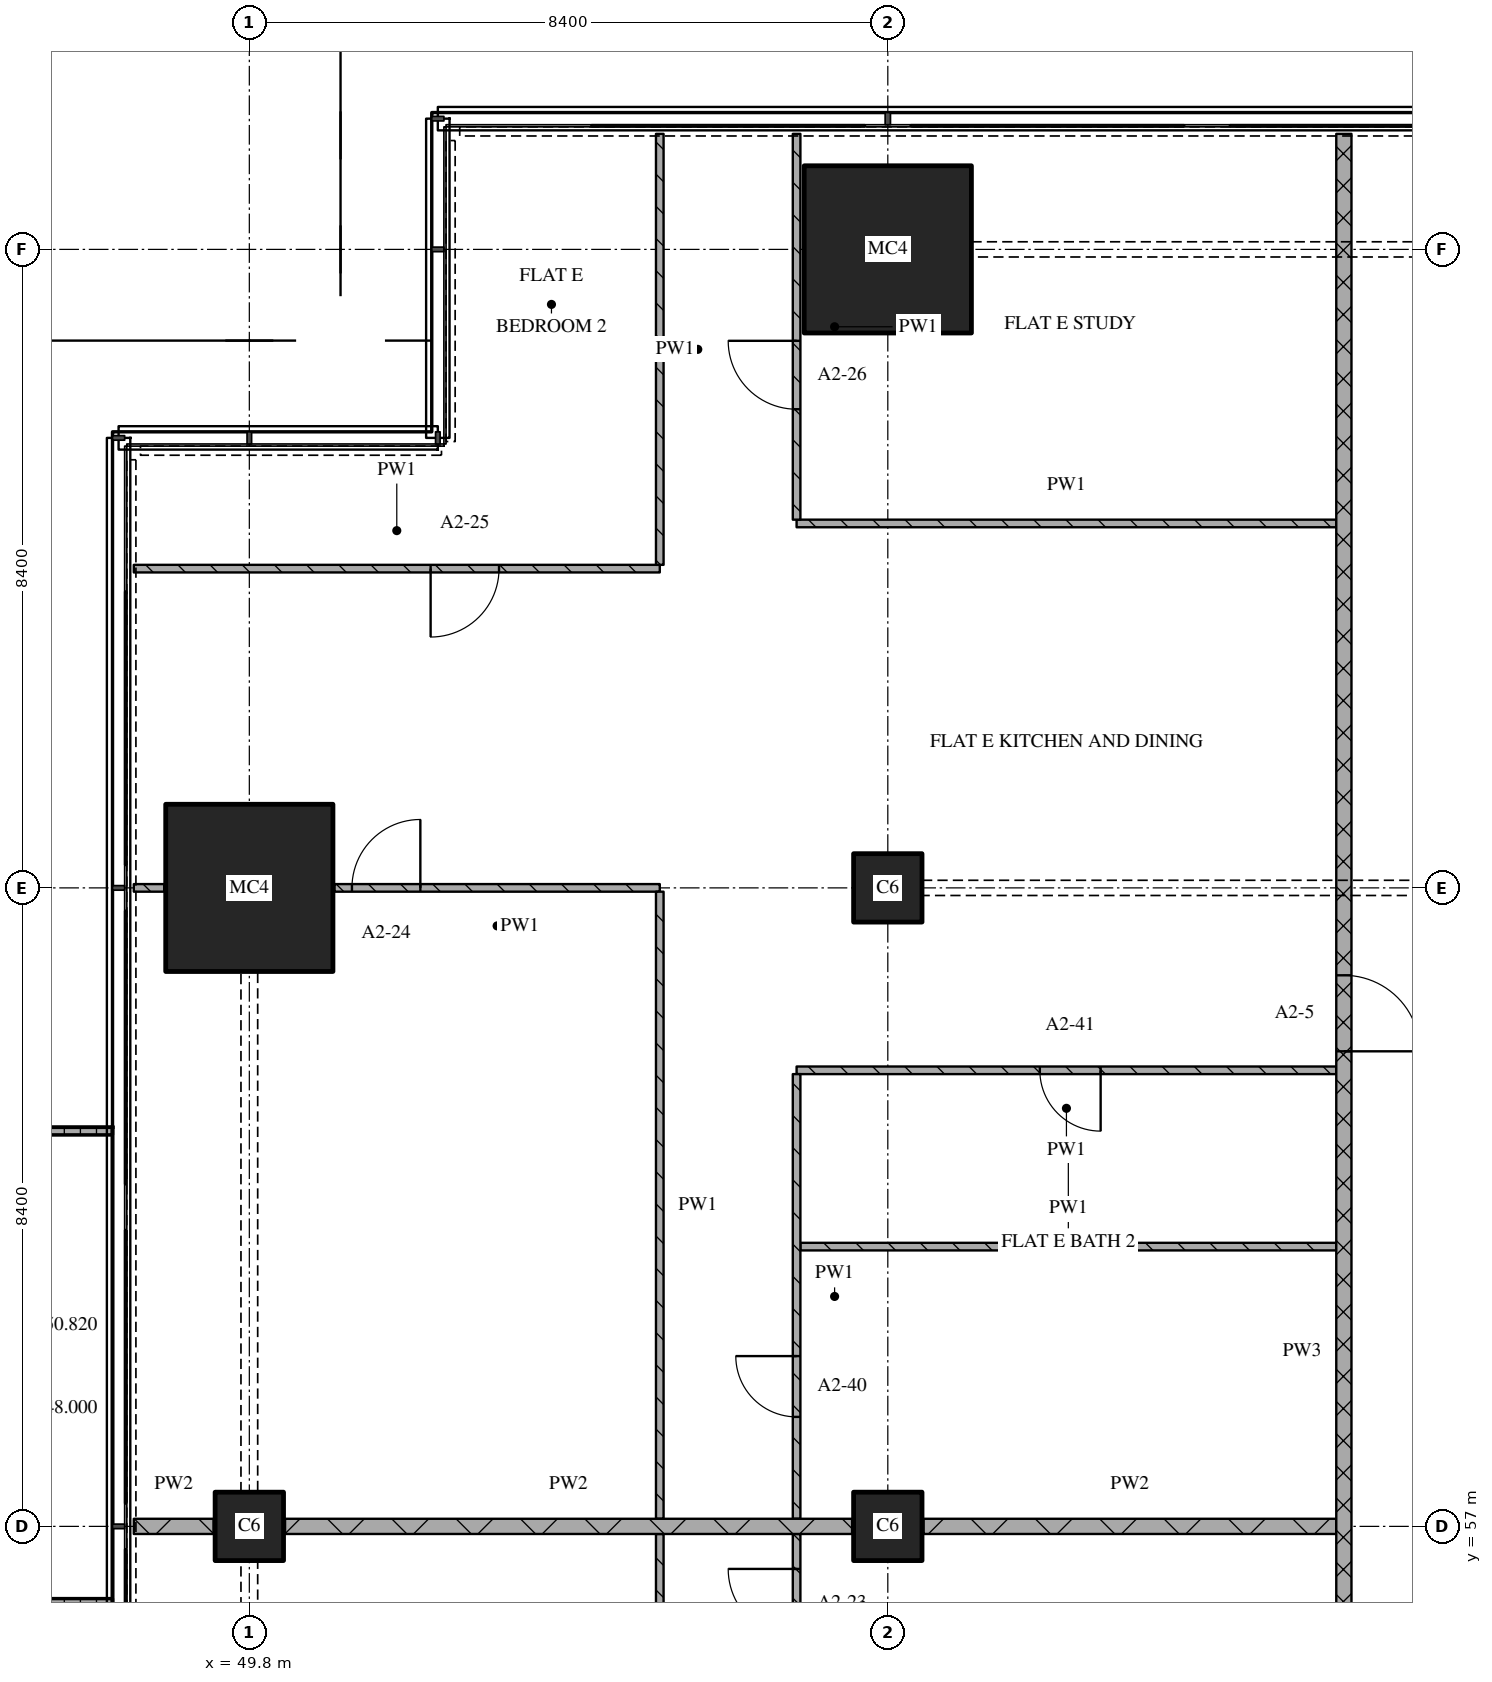
"""IFC4 building model, lengths in metres.
Left out: names, types, materials, properties, quantities, classifications, styles, units other than length and angle.
Written with IfcOpenShell. Run it as: python <this file> out.ifc"""

import sys

from ifc_helpers import new_model, si_unit, direction, frame, frame_2d, origin, origin_2d, place, context, subcontext, project, spatial, polyline, rectangle, outline, extrude, element, fill, save


model = new_model("IFC4")
c1 = context("Model", 3, precision=1e-05, world=origin(), true_north=direction((0.0, 1.0)))
c2 = subcontext(c1, "Body", "Model", "MODEL_VIEW")
j1 = project(units=[si_unit("LENGTHUNIT", "METRE"), si_unit("PLANEANGLEUNIT", "RADIAN")], contexts=[c1])
p1 = place(None, origin())
s1 = spatial("IfcSite", under=j1, at=p1, CompositionType="ELEMENT")
p2 = place(p1, origin())
s2 = spatial("IfcBuilding", under=s1, at=p2, CompositionType="ELEMENT")
p3 = place(p2, frame((0.0, 0.0, 48.0)))
s3 = spatial("IfcBuildingStorey", under=s2, at=p3, CompositionType="ELEMENT", Elevation=48.0)
p4 = place(p3, frame((49.8, 57.0, 0.0), z_axis=(0.0, 0.0, 1.0), x_axis=(1.0, 0.0, 0.0)))
e1 = element("IfcColumn", 1, at=p4, inside=s3, PredefinedType="COLUMN", context=c2, shape_type="SweptSolid", body=[
    extrude(rectangle(XDim=0.9, YDim=0.9, at=origin_2d()), origin(), (0.0, 0.0, 1.0), 3.6),
])
p5 = place(p3, frame((49.8, 65.4, 0.0), z_axis=(0.0, 0.0, 1.0), x_axis=(1.0, 0.0, 0.0)))
e2 = element("IfcColumn", 2, at=p5, inside=s3, PredefinedType="COLUMN", context=c2, shape_type="SweptSolid", body=[
    extrude(rectangle(XDim=2.2, YDim=2.2, at=origin_2d()), origin(), (0.0, 0.0, 1.0), 3.6),
])
for number, where, z_axis, x_axis in (
    (3, (58.2, 57.0, 0.0), (0.0, 0.0, 1.0), (1.0, 0.0, 0.0)),
    (4, (58.2, 65.4, 0.0), (0.0, 0.0, 1.0), (1.0, 0.0, 0.0)),
):
    element("IfcColumn", number, at=place(p3, frame(where, z_axis=z_axis, x_axis=x_axis)), inside=s3, PredefinedType="COLUMN", context=c2, shape_type="SweptSolid", body=[
        extrude(rectangle(XDim=0.9, YDim=0.9, at=origin_2d()), origin(), (0.0, 0.0, 1.0), 3.6),
    ])
p6 = place(p3, frame((58.2, 73.8, 0.0), z_axis=(0.0, 0.0, 1.0), x_axis=(1.0, 0.0, 0.0)))
e5 = element("IfcColumn", 5, at=p6, inside=s3, PredefinedType="COLUMN", context=c2, shape_type="SweptSolid", body=[
    extrude(rectangle(XDim=2.2, YDim=2.2, at=origin_2d()), origin(), (0.0, 0.0, 1.0), 3.6),
])
p7 = place(p3, origin())
e6 = element("IfcWall", 6, at=p7, inside=s3, PredefinedType="SOLIDWALL", context=c2, shape_type="SweptSolid", body=[
    extrude(outline(polyline([(48.0, 62.25), (48.0, 62.15), (46.233, 62.15), (46.233, 56.05), (48.0, 56.05), (48.0, 55.95), (46.133, 55.95), (46.133, 62.25), (48.0, 62.25)])), origin(), (0.0, 0.0, 1.0), 1.0),
])
p8 = place(p3, frame((48.28, 57.0, 0.0), z_axis=(0.0, 0.0, 1.0), x_axis=(1.0, 0.0, 0.0)))
e7 = element("IfcWall", 7, at=p8, inside=s3, PredefinedType="PARTITIONING", context=c2, shape_type="SweptSolid", body=[
    extrude(rectangle(XDim=1.05, YDim=0.2, at=frame_2d((0.525, 0.0))), origin(), (0.0, 0.0, 1.0), 3.32),
])
p9 = place(p3, frame((50.27, 57.0, 0.0), z_axis=(0.0, 0.0, 1.0), x_axis=(1.0, 0.0, 0.0)))
e8 = element("IfcWall", 8, at=p9, inside=s3, PredefinedType="PARTITIONING", context=c2, shape_type="SweptSolid", body=[
    extrude(rectangle(XDim=7.46, YDim=0.2, at=frame_2d((3.73, 0.0))), origin(), (0.0, 0.0, 1.0), 3.32),
])
p10 = place(p3, frame((58.67, 57.0, 0.0), z_axis=(0.0, 0.0, 1.0), x_axis=(1.0, 0.0, 0.0)))
e9 = element("IfcWall", 9, at=p10, inside=s3, PredefinedType="PARTITIONING", context=c2, shape_type="SweptSolid", body=[
    extrude(rectangle(XDim=5.43, YDim=0.2, at=frame_2d((2.715, 0.0))), origin(), (0.0, 0.0, 1.0), 3.32),
])
p11 = place(p3, frame((57.05, 60.681, 0.0), z_axis=(0.0, 0.0, 1.0), x_axis=(1.0, 0.0, 0.0)))
e10 = element("IfcWall", 10, at=p11, inside=s3, PredefinedType="PARTITIONING", context=c2, shape_type="SweptSolid", body=[
    extrude(rectangle(XDim=7.05, YDim=0.1, at=frame_2d((3.525, 0.0))), origin(), (0.0, 0.0, 1.0), 3.32),
])
p12 = place(p3, frame((64.1, 63.0, 0.0), z_axis=(0.0, 0.0, 1.0), x_axis=(-1.0, 0.0, 0.0)))
e11 = element("IfcWall", 11, at=p12, inside=s3, PredefinedType="PARTITIONING", context=c2, shape_type="SweptSolid", body=[
    extrude(rectangle(XDim=7.1, YDim=0.1, at=frame_2d((3.55, 0.0))), origin(), (0.0, 0.0, 1.0), 3.32),
])
p13 = place(p12, frame((3.1, 0.0, 0.0)))
e12 = element("IfcOpeningElement", 12, at=p13, cuts=e11, PredefinedType="OPENING", context=c2, shape_type="SweptSolid", body=[
    extrude(rectangle(XDim=0.8, YDim=2.1, at=frame_2d((0.4, 1.05))), frame((0.0, 0.06, 0.0), z_axis=(0.0, -1.0, 0.0), x_axis=(1.0, 0.0, 0.0)), (0.0, 0.0, 1.0), 0.12),
])
p14 = place(p3, frame((48.28, 65.4, 0.0), z_axis=(0.0, 0.0, 1.0), x_axis=(1.0, 0.0, 0.0)))
e13 = element("IfcWall", 13, at=p14, inside=s3, PredefinedType="PARTITIONING", context=c2, shape_type="SweptSolid", body=[
    extrude(rectangle(XDim=0.4, YDim=0.1, at=frame_2d((0.2, 0.0))), origin(), (0.0, 0.0, 1.0), 3.32),
])
p15 = place(p3, frame((55.2, 65.4, 0.0), z_axis=(0.0, 0.0, 1.0), x_axis=(-1.0, 0.0, 0.0)))
e14 = element("IfcWall", 14, at=p15, inside=s3, PredefinedType="PARTITIONING", context=c2, shape_type="SweptSolid", body=[
    extrude(rectangle(XDim=4.28, YDim=0.1, at=frame_2d((2.14, 0.0))), origin(), (0.0, 0.0, 1.0), 3.32),
])
p16 = place(p15, frame((3.15, 0.0, 0.0)))
e15 = element("IfcOpeningElement", 15, at=p16, cuts=e14, PredefinedType="OPENING", context=c2, shape_type="SweptSolid", body=[
    extrude(rectangle(XDim=0.9, YDim=2.1, at=frame_2d((0.45, 1.05))), frame((0.0, 0.06, 0.0), z_axis=(0.0, -1.0, 0.0), x_axis=(1.0, 0.0, 0.0)), (0.0, 0.0, 1.0), 0.12),
])
p17 = place(p3, frame((48.28, 69.6, 0.0), z_axis=(0.0, 0.0, 1.0), x_axis=(1.0, 0.0, 0.0)))
e16 = element("IfcWall", 16, at=p17, inside=s3, PredefinedType="PARTITIONING", context=c2, shape_type="SweptSolid", body=[
    extrude(rectangle(XDim=6.92, YDim=0.1, at=frame_2d((3.46, 0.0))), origin(), (0.0, 0.0, 1.0), 3.32),
])
p18 = place(p17, frame((3.905, 0.0, 0.0)))
e17 = element("IfcOpeningElement", 17, at=p18, cuts=e16, PredefinedType="OPENING", context=c2, shape_type="SweptSolid", body=[
    extrude(rectangle(XDim=0.9, YDim=2.1, at=frame_2d((0.45, 1.05))), frame((0.0, 0.06, 0.0), z_axis=(0.0, -1.0, 0.0), x_axis=(1.0, 0.0, 0.0)), (0.0, 0.0, 1.0), 0.12),
])
p19 = place(p3, frame((57.0, 70.194, 0.0), z_axis=(0.0, 0.0, 1.0), x_axis=(1.0, 0.0, 0.0)))
e18 = element("IfcWall", 18, at=p19, inside=s3, PredefinedType="PARTITIONING", context=c2, shape_type="SweptSolid", body=[
    extrude(rectangle(XDim=7.1, YDim=0.1, at=frame_2d((3.55, 0.0))), origin(), (0.0, 0.0, 1.0), 3.32),
])
p20 = place(p3, frame((55.2, 75.32, 0.0), z_axis=(0.0, 0.0, 1.0), x_axis=(0.0, -1.0, 0.0)))
e19 = element("IfcWall", 19, at=p20, inside=s3, PredefinedType="PARTITIONING", context=c2, shape_type="SweptSolid", body=[
    extrude(rectangle(XDim=5.67, YDim=0.1, at=frame_2d((2.835, 0.0))), origin(), (0.0, 0.0, 1.0), 3.32),
])
p21 = place(p3, frame((57.0, 75.32, 0.0), z_axis=(0.0, 0.0, 1.0), x_axis=(0.0, -1.0, 0.0)))
e20 = element("IfcWall", 20, at=p21, inside=s3, PredefinedType="PARTITIONING", context=c2, shape_type="SweptSolid", body=[
    extrude(rectangle(XDim=5.076, YDim=0.1, at=frame_2d((2.538, 0.0))), origin(), (0.0, 0.0, 1.0), 3.32),
])
p22 = place(p21, frame((2.723, 0.0, 0.0)))
e21 = element("IfcOpeningElement", 21, at=p22, cuts=e20, PredefinedType="OPENING", context=c2, shape_type="SweptSolid", body=[
    extrude(rectangle(XDim=0.9, YDim=2.1, at=frame_2d((0.45, 1.05))), frame((0.0, 0.06, 0.0), z_axis=(0.0, -1.0, 0.0), x_axis=(1.0, 0.0, 0.0)), (0.0, 0.0, 1.0), 0.12),
])
p23 = place(p3, frame((64.2, 43.3, 0.0), z_axis=(0.0, 0.0, 1.0), x_axis=(0.0, 1.0, 0.0)))
e22 = element("IfcWall", 22, at=p23, inside=s3, PredefinedType="PARTITIONING", context=c2, shape_type="SweptSolid", body=[
    extrude(rectangle(XDim=32.02, YDim=0.2, at=frame_2d((16.01, 0.0))), origin(), (0.0, 0.0, 1.0), 3.32),
])
p24 = place(p23, frame((19.95, 0.0, 0.0)))
e23 = element("IfcOpeningElement", 23, at=p24, cuts=e22, PredefinedType="OPENING", context=c2, shape_type="SweptSolid", body=[
    extrude(rectangle(XDim=1.0, YDim=2.1, at=frame_2d((0.5, 1.05))), frame((0.0, 0.11, 0.0), z_axis=(0.0, -1.0, 0.0), x_axis=(1.0, 0.0, 0.0)), (0.0, 0.0, 1.0), 0.22),
])
for number, where, z_axis, x_axis in (
    (24, (55.2, 56.9, 0.0), (0.0, 0.0, 1.0), (0.0, -1.0, 0.0)),
    (25, (55.2, 65.35, 0.0), (0.0, 0.0, 1.0), (0.0, -1.0, 0.0)),
):
    element("IfcWall", number, at=place(p3, frame(where, z_axis=z_axis, x_axis=x_axis)), inside=s3, PredefinedType="PARTITIONING", context=c2, shape_type="SweptSolid", body=[
        extrude(rectangle(XDim=8.25, YDim=0.1, at=frame_2d((4.125, 0.0))), origin(), (0.0, 0.0, 1.0), 3.32),
    ])
p25 = place(p3, frame((57.0, 56.9, 0.0), z_axis=(0.0, 0.0, 1.0), x_axis=(0.0, -1.0, 0.0)))
e26 = element("IfcWall", 26, at=p25, inside=s3, PredefinedType="PARTITIONING", context=c2, shape_type="SweptSolid", body=[
    extrude(rectangle(XDim=5.25, YDim=0.1, at=frame_2d((2.625, 0.0))), origin(), (0.0, 0.0, 1.0), 3.32),
])
p26 = place(p25, frame((0.46, 0.0, 0.0)))
e27 = element("IfcOpeningElement", 27, at=p26, cuts=e26, PredefinedType="OPENING", context=c2, shape_type="SweptSolid", body=[
    extrude(rectangle(XDim=0.9, YDim=2.1, at=frame_2d((0.45, 1.05))), frame((0.0, 0.06, 0.0), z_axis=(0.0, -1.0, 0.0), x_axis=(1.0, 0.0, 0.0)), (0.0, 0.0, 1.0), 0.12),
])
p27 = place(p3, frame((57.0, 62.95, 0.0), z_axis=(0.0, 0.0, 1.0), x_axis=(0.0, -1.0, 0.0)))
e28 = element("IfcWall", 28, at=p27, inside=s3, PredefinedType="PARTITIONING", context=c2, shape_type="SweptSolid", body=[
    extrude(rectangle(XDim=5.85, YDim=0.1, at=frame_2d((2.925, 0.0))), origin(), (0.0, 0.0, 1.0), 3.32),
])
p28 = place(p27, frame((3.71, 0.0, 0.0)))
e29 = element("IfcOpeningElement", 29, at=p28, cuts=e28, PredefinedType="OPENING", context=c2, shape_type="SweptSolid", body=[
    extrude(rectangle(XDim=0.8, YDim=2.1, at=frame_2d((0.4, 1.05))), frame((0.0, 0.06, 0.0), z_axis=(0.0, -1.0, 0.0), x_axis=(1.0, 0.0, 0.0)), (0.0, 0.0, 1.0), 0.12),
])
p29 = place(p13, origin())
e30 = element("IfcDoor", 30, at=p29, inside=s3, OperationType="SINGLE_SWING_LEFT", PredefinedType="DOOR", context=c2, shape_type="SweptSolid", body=[
    extrude(rectangle(XDim=0.8, YDim=2.1, at=frame_2d((0.4, 1.05))), frame((0.0, 0.025, 0.0), z_axis=(0.0, -1.0, 0.0), x_axis=(1.0, 0.0, 0.0)), (0.0, 0.0, 1.0), 0.05),
])
fill(e12, e30)
p30 = place(p16, origin())
e31 = element("IfcDoor", 31, at=p30, inside=s3, OperationType="SINGLE_SWING_RIGHT", PredefinedType="DOOR", context=c2, shape_type="SweptSolid", body=[
    extrude(rectangle(XDim=0.9, YDim=2.1, at=frame_2d((0.45, 1.05))), frame((0.0, 0.025, 0.0), z_axis=(0.0, -1.0, 0.0), x_axis=(1.0, 0.0, 0.0)), (0.0, 0.0, 1.0), 0.05),
])
fill(e15, e31)
p31 = place(p18, origin())
e32 = element("IfcDoor", 32, at=p31, inside=s3, OperationType="SINGLE_SWING_RIGHT", PredefinedType="DOOR", context=c2, shape_type="SweptSolid", body=[
    extrude(rectangle(XDim=0.9, YDim=2.1, at=frame_2d((0.45, 1.05))), frame((0.0, 0.025, 0.0), z_axis=(0.0, -1.0, 0.0), x_axis=(1.0, 0.0, 0.0)), (0.0, 0.0, 1.0), 0.05),
])
fill(e17, e32)
p32 = place(p22, origin())
e33 = element("IfcDoor", 33, at=p32, inside=s3, OperationType="SINGLE_SWING_RIGHT", PredefinedType="DOOR", context=c2, shape_type="SweptSolid", body=[
    extrude(rectangle(XDim=0.9, YDim=2.1, at=frame_2d((0.45, 1.05))), frame((0.0, 0.025, 0.0), z_axis=(0.0, -1.0, 0.0), x_axis=(1.0, 0.0, 0.0)), (0.0, 0.0, 1.0), 0.05),
])
fill(e21, e33)
p33 = place(p24, origin())
e34 = element("IfcDoor", 34, at=p33, inside=s3, OperationType="SINGLE_SWING_RIGHT", PredefinedType="DOOR", context=c2, shape_type="SweptSolid", body=[
    extrude(rectangle(XDim=1.0, YDim=2.1, at=frame_2d((0.5, 1.05))), frame((0.0, 0.025, 0.0), z_axis=(0.0, -1.0, 0.0), x_axis=(1.0, 0.0, 0.0)), (0.0, 0.0, 1.0), 0.05),
])
fill(e23, e34)
p34 = place(p26, origin())
e35 = element("IfcDoor", 35, at=p34, inside=s3, OperationType="SINGLE_SWING_RIGHT", PredefinedType="DOOR", context=c2, shape_type="SweptSolid", body=[
    extrude(rectangle(XDim=0.9, YDim=2.1, at=frame_2d((0.45, 1.05))), frame((0.0, 0.025, 0.0), z_axis=(0.0, -1.0, 0.0), x_axis=(1.0, 0.0, 0.0)), (0.0, 0.0, 1.0), 0.05),
])
fill(e27, e35)
p35 = place(p28, origin())
e36 = element("IfcDoor", 36, at=p35, inside=s3, OperationType="SINGLE_SWING_RIGHT", PredefinedType="DOOR", context=c2, shape_type="SweptSolid", body=[
    extrude(rectangle(XDim=0.8, YDim=2.1, at=frame_2d((0.4, 1.05))), frame((0.0, 0.025, 0.0), z_axis=(0.0, -1.0, 0.0), x_axis=(1.0, 0.0, 0.0)), (0.0, 0.0, 1.0), 0.05),
])
fill(e29, e36)
save(model, sys.argv[1])
